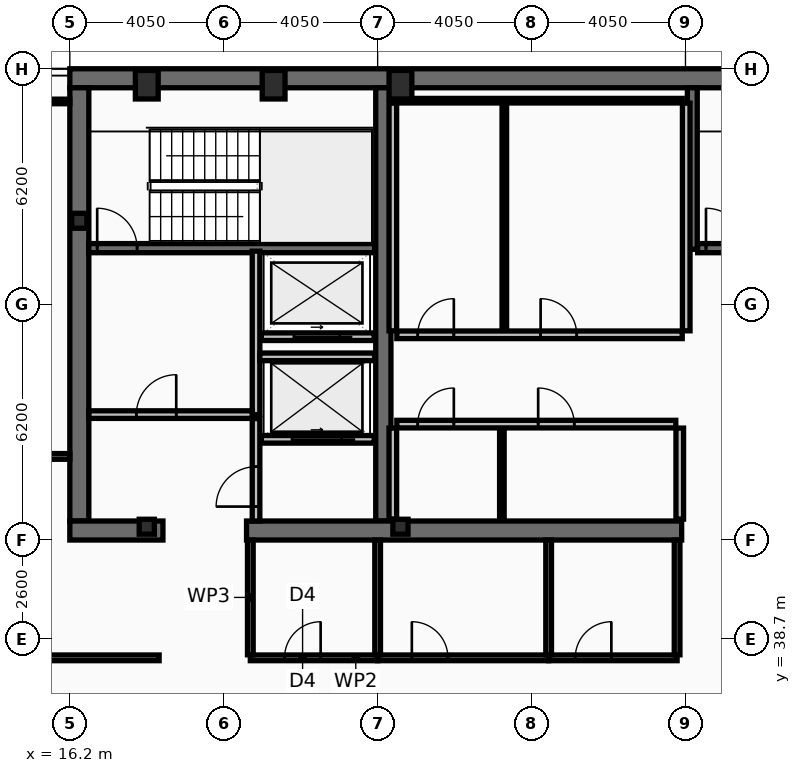
"""IFC4 building model, lengths in metres.
Left out: names, types, materials, properties, quantities, classifications, styles, units other than length and angle.
Written with IfcOpenShell. Run it as: python <this file> out.ifc"""

import sys

from ifc_helpers import new_model, si_unit, direction, frame, frame_2d, origin, origin_2d, place, context, subcontext, project, spatial, rectangle, hollow_rectangle, i_section, extrude, element, fill, save


model = new_model("IFC4")
c1 = context("Model", 3, precision=1e-05, world=origin(), true_north=direction((0.0, 1.0)))
c2 = subcontext(c1, "Body", "Model", "MODEL_VIEW")
j1 = project(units=[si_unit("LENGTHUNIT", "METRE"), si_unit("PLANEANGLEUNIT", "RADIAN")], contexts=[c1])
p1 = place(None, origin())
s1 = spatial("IfcSite", under=j1, at=p1, CompositionType="ELEMENT")
p2 = place(p1, origin())
s2 = spatial("IfcBuilding", under=s1, at=p2, CompositionType="ELEMENT")
p3 = place(p2, frame((0.0, 0.0, 287.8)))
s3 = spatial("IfcBuildingStorey", under=s2, at=p3, CompositionType="ELEMENT", Elevation=287.8)
p4 = place(p3, frame((16.2, 53.45, 0.0), z_axis=(0.0, 0.0, 1.0), x_axis=(1.0, 0.0, 0.0)))
e1 = element("IfcWall", 1, at=p4, inside=s3, PredefinedType="SHEAR", context=c2, shape_type="SweptSolid", body=[
    extrude(rectangle(XDim=40.5, YDim=0.5, at=frame_2d((20.25, 0.0))), origin(), (0.0, 0.0, 1.0), 3.44),
])
p5 = place(p3, frame((16.45, 41.8, 0.0), z_axis=(0.0, 0.0, 1.0), x_axis=(0.0, 1.0, 0.0)))
e2 = element("IfcWall", 2, at=p5, inside=s3, PredefinedType="SHEAR", context=c2, shape_type="SweptSolid", body=[
    extrude(rectangle(XDim=11.4, YDim=0.5, at=frame_2d((5.7, 0.0))), origin(), (0.0, 0.0, 1.0), 3.44),
])
p6 = place(p3, frame((24.45, 41.8, 0.0), z_axis=(0.0, 0.0, 1.0), x_axis=(0.0, 1.0, 0.0)))
e3 = element("IfcWall", 3, at=p6, inside=s3, PredefinedType="SHEAR", context=c2, shape_type="SweptSolid", body=[
    extrude(rectangle(XDim=11.4, YDim=0.4, at=frame_2d((5.7, 0.0))), origin(), (0.0, 0.0, 1.0), 3.44),
])
p7 = place(p3, frame((18.65, 41.55, 0.0), z_axis=(0.0, 0.0, 1.0), x_axis=(-1.0, 0.0, 0.0)))
e4 = element("IfcWall", 4, at=p7, inside=s3, PredefinedType="SHEAR", context=c2, shape_type="SweptSolid", body=[
    extrude(rectangle(XDim=2.45, YDim=0.5, at=frame_2d((1.225, 0.0))), origin(), (0.0, 0.0, 1.0), 3.44),
])
p8 = place(p3, frame((32.3, 41.55, 0.0), z_axis=(0.0, 0.0, 1.0), x_axis=(-1.0, 0.0, 0.0)))
e5 = element("IfcWall", 5, at=p8, inside=s3, PredefinedType="SHEAR", context=c2, shape_type="SweptSolid", body=[
    extrude(rectangle(XDim=11.45, YDim=0.5, at=frame_2d((5.725, 0.0))), origin(), (0.0, 0.0, 1.0), 3.44),
])
p9 = place(p3, frame((32.58, 48.95, 0.0), z_axis=(0.0, 0.0, 1.0), x_axis=(0.0, 1.0, 0.0)))
e6 = element("IfcWall", 6, at=p9, inside=s3, PredefinedType="SHEAR", context=c2, shape_type="SweptSolid", body=[
    extrude(rectangle(XDim=4.25, YDim=0.26, at=frame_2d((2.125, 0.0))), origin(), (0.0, 0.0, 1.0), 3.44),
])
p10 = place(p3, frame((16.7, 48.98, 0.0), z_axis=(0.0, 0.0, 1.0), x_axis=(1.0, 0.0, 0.0)))
e7 = element("IfcWall", 7, at=p10, inside=s3, PredefinedType="SHEAR", context=c2, shape_type="SweptSolid", body=[
    extrude(rectangle(XDim=7.52, YDim=0.24, at=frame_2d((3.76, 0.0))), origin(), (0.0, 0.0, 1.0), 3.44),
])
p11 = place(p10, frame((0.22, 0.0, 0.0)))
e8 = element("IfcOpeningElement", 8, at=p11, cuts=e7, PredefinedType="OPENING", context=c2, shape_type="SweptSolid", body=[
    extrude(rectangle(XDim=1.05, YDim=2.15, at=frame_2d((0.525, 1.075))), frame((0.0, 0.13, 0.0), z_axis=(0.0, -1.0, 0.0), x_axis=(1.0, 0.0, 0.0)), (0.0, 0.0, 1.0), 0.26),
])
p12 = place(p3, frame((32.72, 48.98, 0.0), z_axis=(0.0, 0.0, 1.0), x_axis=(1.0, 0.0, 0.0)))
e9 = element("IfcWall", 9, at=p12, inside=s3, PredefinedType="SHEAR", context=c2, shape_type="SweptSolid", body=[
    extrude(rectangle(XDim=7.56, YDim=0.24, at=frame_2d((3.78, 0.0))), origin(), (0.0, 0.0, 1.0), 3.44),
])
p13 = place(p12, frame((0.22, 0.0, 0.0)))
e10 = element("IfcOpeningElement", 10, at=p13, cuts=e9, PredefinedType="OPENING", context=c2, shape_type="SweptSolid", body=[
    extrude(rectangle(XDim=1.05, YDim=2.15, at=frame_2d((0.525, 1.075))), frame((0.0, 0.13, 0.0), z_axis=(0.0, -1.0, 0.0), x_axis=(1.0, 0.0, 0.0)), (0.0, 0.0, 1.0), 0.26),
])
for number, where, z_axis, x_axis in (
    (11, (18.225, 53.28, 0.0), (0.0, 0.0, 1.0), (1.0, 0.0, 0.0)),
    (12, (21.562, 53.28, 0.0), (0.0, 0.0, 1.0), (1.0, 0.0, 0.0)),
    (13, (24.9, 53.28, 0.0), (0.0, 0.0, 1.0), (1.0, 0.0, 0.0)),
):
    element("IfcColumn", number, at=place(p3, frame(where, z_axis=z_axis, x_axis=x_axis)), inside=s3, PredefinedType="COLUMN", context=c2, shape_type="SweptSolid", body=[
        extrude(hollow_rectangle(XDim=0.6, YDim=0.75, WallThickness=0.045, at=origin_2d()), origin(), (0.0, 0.0, 1.0), 3.6),
    ])
for number, where, z_axis, x_axis in (
    (14, (16.45, 49.7, 0.0), (0.0, 0.0, 1.0), (1.0, 0.0, 0.0)),
    (15, (18.225, 41.65, 0.0), (0.0, 0.0, 1.0), (1.0, 0.0, 0.0)),
    (16, (24.9, 41.65, 0.0), (0.0, 0.0, 1.0), (1.0, 0.0, 0.0)),
):
    element("IfcColumn", number, at=place(p3, frame(where, z_axis=z_axis, x_axis=x_axis)), inside=s3, PredefinedType="COLUMN", context=c2, shape_type="SweptSolid", body=[
        extrude(i_section(OverallWidth=0.399, OverallDepth=0.393, WebThickness=0.023, FlangeThickness=0.037, at=origin_2d()), origin(), (0.0, 0.0, 1.0), 3.6),
    ])
p14 = place(p3, frame((24.21, 43.95, 0.0), z_axis=(0.0, 0.0, 1.0), x_axis=(-1.0, 0.0, 0.0)))
e17 = element("IfcWall", 17, at=p14, inside=s3, PredefinedType="PARTITIONING", context=c2, shape_type="SweptSolid", body=[
    extrude(rectangle(XDim=2.97, YDim=0.2, at=frame_2d((1.485, 0.0))), origin(), (0.0, 0.0, 1.0), 3.44),
])
p15 = place(p14, frame((0.86, 0.0, 0.0)))
e18 = element("IfcOpeningElement", 18, at=p15, cuts=e17, PredefinedType="OPENING", context=c2, shape_type="SweptSolid", body=[
    extrude(rectangle(XDim=1.3, YDim=2.18, at=frame_2d((0.65, 1.09))), frame((0.0, 0.11, 0.0), z_axis=(0.0, -1.0, 0.0), x_axis=(1.0, 0.0, 0.0)), (0.0, 0.0, 1.0), 0.22),
])
p16 = place(p3, frame((24.21, 46.65, 0.0), z_axis=(0.0, 0.0, 1.0), x_axis=(-1.0, 0.0, 0.0)))
e19 = element("IfcWall", 19, at=p16, inside=s3, PredefinedType="PARTITIONING", context=c2, shape_type="SweptSolid", body=[
    extrude(rectangle(XDim=2.97, YDim=0.2, at=frame_2d((1.485, 0.0))), origin(), (0.0, 0.0, 1.0), 3.44),
])
p17 = place(p16, frame((0.91, 0.0, 0.0)))
e20 = element("IfcOpeningElement", 20, at=p17, cuts=e19, PredefinedType="OPENING", context=c2, shape_type="SweptSolid", body=[
    extrude(rectangle(XDim=1.2, YDim=2.18, at=frame_2d((0.6, 1.09))), frame((0.0, 0.11, 0.0), z_axis=(0.0, -1.0, 0.0), x_axis=(1.0, 0.0, 0.0)), (0.0, 0.0, 1.0), 0.22),
])
p18 = place(p3, frame((21.1, 44.6, 0.0), z_axis=(0.0, 0.0, 1.0), x_axis=(0.0, 1.0, 0.0)))
e21 = element("IfcWall", 21, at=p18, inside=s3, PredefinedType="PARTITIONING", context=c2, shape_type="SweptSolid", body=[
    extrude(rectangle(XDim=4.3, YDim=0.2, at=frame_2d((2.15, 0.0))), origin(), (0.0, 0.0, 1.0), 3.44),
])
p19 = place(p3, frame((16.7, 44.6, 0.0), z_axis=(0.0, 0.0, 1.0), x_axis=(1.0, 0.0, 0.0)))
e22 = element("IfcWall", 22, at=p19, inside=s3, PredefinedType="PARTITIONING", context=c2, shape_type="SweptSolid", body=[
    extrude(rectangle(XDim=4.3, YDim=0.2, at=frame_2d((2.15, 0.0))), origin(), (0.0, 0.0, 1.0), 3.44),
])
p20 = place(p19, frame((1.25, 0.0, 0.0)))
e23 = element("IfcOpeningElement", 23, at=p20, cuts=e22, PredefinedType="OPENING", context=c2, shape_type="SweptSolid", body=[
    extrude(rectangle(XDim=1.05, YDim=2.15, at=frame_2d((0.525, 1.075))), frame((0.0, 0.11, 0.0), z_axis=(0.0, -1.0, 0.0), x_axis=(1.0, 0.0, 0.0)), (0.0, 0.0, 1.0), 0.22),
])
p21 = place(p3, frame((21.2, 46.12, 0.0), z_axis=(0.0, 0.0, 1.0), x_axis=(1.0, 0.0, 0.0)))
e24 = element("IfcWall", 24, at=p21, inside=s3, PredefinedType="PARTITIONING", context=c2, shape_type="SweptSolid", body=[
    extrude(rectangle(XDim=3.02, YDim=0.2, at=frame_2d((1.51, 0.0))), origin(), (0.0, 0.0, 1.0), 3.44),
])
p22 = place(p3, frame((21.1, 41.8, 0.0), z_axis=(0.0, 0.0, 1.0), x_axis=(0.0, 1.0, 0.0)))
e25 = element("IfcWall", 25, at=p22, inside=s3, PredefinedType="PARTITIONING", context=c2, shape_type="SweptSolid", body=[
    extrude(rectangle(XDim=2.695, YDim=0.2, at=frame_2d((1.348, 0.0))), origin(), (0.0, 0.0, 1.0), 3.44),
])
p23 = place(p22, frame((0.38, 0.0, 0.0)))
e26 = element("IfcOpeningElement", 26, at=p23, cuts=e25, PredefinedType="OPENING", context=c2, shape_type="SweptSolid", body=[
    extrude(rectangle(XDim=1.05, YDim=2.15, at=frame_2d((0.525, 1.075))), frame((0.0, 0.11, 0.0), z_axis=(0.0, -1.0, 0.0), x_axis=(1.0, 0.0, 0.0)), (0.0, 0.0, 1.0), 0.22),
])
for number, where, z_axis, x_axis in (
    (27, (24.7, 46.805, 0.0), (0.0, 0.0, 1.0), (0.0, 1.0, 0.0)),
    (28, (32.42, 46.805, 0.0), (0.0, 0.0, 1.0), (0.0, 1.0, 0.0)),
):
    element("IfcWall", number, at=place(p3, frame(where, z_axis=z_axis, x_axis=x_axis)), inside=s3, PredefinedType="PARTITIONING", context=c2, shape_type="SweptSolid", body=[
        extrude(rectangle(XDim=5.99, YDim=0.2, at=frame_2d((2.995, 0.0))), origin(), (0.0, 0.0, 1.0), 3.44),
    ])
p24 = place(p3, frame((24.805, 52.86, 0.0), z_axis=(0.0, 0.0, 1.0), x_axis=(1.0, 0.0, 0.0)))
e29 = element("IfcWall", 29, at=p24, inside=s3, PredefinedType="PARTITIONING", context=c2, shape_type="SweptSolid", body=[
    extrude(rectangle(XDim=7.51, YDim=0.12, at=frame_2d((3.755, 0.0))), origin(), (0.0, 0.0, 1.0), 3.44),
])
p25 = place(p3, frame((27.634, 46.805, 0.0), z_axis=(0.0, 0.0, 1.0), x_axis=(0.0, 1.0, 0.0)))
e30 = element("IfcWall", 30, at=p25, inside=s3, PredefinedType="PARTITIONING", context=c2, shape_type="SweptSolid", body=[
    extrude(rectangle(XDim=5.99, YDim=0.12, at=frame_2d((2.995, 0.0))), origin(), (0.0, 0.0, 1.0), 3.44),
])
p26 = place(p3, frame((24.805, 46.7, 0.0), z_axis=(0.0, 0.0, 1.0), x_axis=(1.0, 0.0, 0.0)))
e31 = element("IfcWall", 31, at=p26, inside=s3, PredefinedType="PARTITIONING", context=c2, shape_type="SweptSolid", body=[
    extrude(rectangle(XDim=7.51, YDim=0.2, at=frame_2d((3.755, 0.0))), origin(), (0.0, 0.0, 1.0), 3.44),
])
p27 = place(p26, frame((0.55, 0.0, 0.0)))
e32 = element("IfcOpeningElement", 32, at=p27, cuts=e31, PredefinedType="OPENING", context=c2, shape_type="SweptSolid", body=[
    extrude(rectangle(XDim=0.95, YDim=2.1, at=frame_2d((0.475, 1.05))), frame((0.0, 0.11, 0.0), z_axis=(0.0, -1.0, 0.0), x_axis=(1.0, 0.0, 0.0)), (0.0, 0.0, 1.0), 0.22),
])
p28 = place(p26, frame((3.784, 0.0, 0.0)))
e33 = element("IfcOpeningElement", 33, at=p28, cuts=e31, PredefinedType="OPENING", context=c2, shape_type="SweptSolid", body=[
    extrude(rectangle(XDim=0.95, YDim=2.1, at=frame_2d((0.475, 1.05))), frame((0.0, 0.11, 0.0), z_axis=(0.0, -1.0, 0.0), x_axis=(1.0, 0.0, 0.0)), (0.0, 0.0, 1.0), 0.22),
])
for number, where, z_axis, x_axis in (
    (34, (24.7, 41.85, 0.0), (0.0, 0.0, 1.0), (0.0, 1.0, 0.0)),
    (35, (32.25, 41.85, 0.0), (0.0, 0.0, 1.0), (0.0, 1.0, 0.0)),
):
    element("IfcWall", number, at=place(p3, frame(where, z_axis=z_axis, x_axis=x_axis)), inside=s3, PredefinedType="PARTITIONING", context=c2, shape_type="SweptSolid", body=[
        extrude(rectangle(XDim=2.395, YDim=0.2, at=frame_2d((1.198, 0.0))), origin(), (0.0, 0.0, 1.0), 3.44),
    ])
p29 = place(p3, frame((27.569, 41.85, 0.0), z_axis=(0.0, 0.0, 1.0), x_axis=(0.0, 1.0, 0.0)))
e36 = element("IfcWall", 36, at=p29, inside=s3, PredefinedType="PARTITIONING", context=c2, shape_type="SweptSolid", body=[
    extrude(rectangle(XDim=2.395, YDim=0.12, at=frame_2d((1.198, 0.0))), origin(), (0.0, 0.0, 1.0), 3.44),
])
p30 = place(p3, frame((24.805, 44.35, 0.0), z_axis=(0.0, 0.0, 1.0), x_axis=(1.0, 0.0, 0.0)))
e37 = element("IfcWall", 37, at=p30, inside=s3, PredefinedType="PARTITIONING", context=c2, shape_type="SweptSolid", body=[
    extrude(rectangle(XDim=7.34, YDim=0.2, at=frame_2d((3.67, 0.0))), origin(), (0.0, 0.0, 1.0), 3.44),
])
p31 = place(p30, frame((0.55, 0.0, 0.0)))
e38 = element("IfcOpeningElement", 38, at=p31, cuts=e37, PredefinedType="OPENING", context=c2, shape_type="SweptSolid", body=[
    extrude(rectangle(XDim=0.95, YDim=2.1, at=frame_2d((0.475, 1.05))), frame((0.0, 0.11, 0.0), z_axis=(0.0, -1.0, 0.0), x_axis=(1.0, 0.0, 0.0)), (0.0, 0.0, 1.0), 0.22),
])
p32 = place(p30, frame((3.719, 0.0, 0.0)))
e39 = element("IfcOpeningElement", 39, at=p32, cuts=e37, PredefinedType="OPENING", context=c2, shape_type="SweptSolid", body=[
    extrude(rectangle(XDim=0.95, YDim=2.1, at=frame_2d((0.475, 1.05))), frame((0.0, 0.11, 0.0), z_axis=(0.0, -1.0, 0.0), x_axis=(1.0, 0.0, 0.0)), (0.0, 0.0, 1.0), 0.22),
])
p33 = place(p3, frame((20.95, 38.2, 0.0), z_axis=(0.0, 0.0, 1.0), x_axis=(1.0, 0.0, 0.0)))
e40 = element("IfcWall", 40, at=p33, inside=s3, PredefinedType="PARTITIONING", context=c2, shape_type="SweptSolid", body=[
    extrude(rectangle(XDim=3.35, YDim=0.15, at=frame_2d((1.675, 0.0))), origin(), (0.0, 0.0, 1.0), 3.44),
])
p34 = place(p33, frame((0.9, 0.0, 0.0)))
e41 = element("IfcOpeningElement", 41, at=p34, cuts=e40, PredefinedType="OPENING", context=c2, shape_type="SweptSolid", body=[
    extrude(rectangle(XDim=0.95, YDim=2.05, at=frame_2d((0.475, 1.025))), frame((0.0, 0.085, 0.0), z_axis=(0.0, -1.0, 0.0), x_axis=(1.0, 0.0, 0.0)), (0.0, 0.0, 1.0), 0.17),
])
p35 = place(p3, frame((24.3, 38.2, 0.0), z_axis=(0.0, 0.0, 1.0), x_axis=(1.0, 0.0, 0.0)))
e42 = element("IfcWall", 42, at=p35, inside=s3, PredefinedType="PARTITIONING", context=c2, shape_type="SweptSolid", body=[
    extrude(rectangle(XDim=4.5, YDim=0.15, at=frame_2d((2.25, 0.0))), origin(), (0.0, 0.0, 1.0), 2.78),
])
p36 = place(p35, frame((0.9, 0.0, 0.0)))
e43 = element("IfcOpeningElement", 43, at=p36, cuts=e42, PredefinedType="OPENING", context=c2, shape_type="SweptSolid", body=[
    extrude(rectangle(XDim=0.95, YDim=2.05, at=frame_2d((0.475, 1.025))), frame((0.0, 0.085, 0.0), z_axis=(0.0, -1.0, 0.0), x_axis=(1.0, 0.0, 0.0)), (0.0, 0.0, 1.0), 0.17),
])
p37 = place(p3, frame((28.8, 38.2, 0.0), z_axis=(0.0, 0.0, 1.0), x_axis=(1.0, 0.0, 0.0)))
e44 = element("IfcWall", 44, at=p37, inside=s3, PredefinedType="PARTITIONING", context=c2, shape_type="SweptSolid", body=[
    extrude(rectangle(XDim=3.38, YDim=0.15, at=frame_2d((1.69, 0.0))), origin(), (0.0, 0.0, 1.0), 2.78),
])
p38 = place(p37, frame((0.7, 0.0, 0.0)))
e45 = element("IfcOpeningElement", 45, at=p38, cuts=e44, PredefinedType="OPENING", context=c2, shape_type="SweptSolid", body=[
    extrude(rectangle(XDim=0.95, YDim=2.05, at=frame_2d((0.475, 1.025))), frame((0.0, 0.085, 0.0), z_axis=(0.0, -1.0, 0.0), x_axis=(1.0, 0.0, 0.0)), (0.0, 0.0, 1.0), 0.17),
])
for number, where, z_axis, x_axis in (
    (46, (20.95, 38.28, 0.0), (0.0, 0.0, 1.0), (0.0, 1.0, 0.0)),
    (47, (24.3, 38.28, 0.0), (0.0, 0.0, 1.0), (0.0, 1.0, 0.0)),
    (48, (28.8, 38.28, 0.0), (0.0, 0.0, 1.0), (0.0, 1.0, 0.0)),
    (49, (32.18, 38.28, 0.0), (0.0, 0.0, 1.0), (0.0, 1.0, 0.0)),
):
    element("IfcWall", number, at=place(p3, frame(where, z_axis=z_axis, x_axis=x_axis)), inside=s3, PredefinedType="PARTITIONING", context=c2, shape_type="SweptSolid", body=[
        extrude(rectangle(XDim=3.02, YDim=0.15, at=frame_2d((1.51, 0.0))), origin(), (0.0, 0.0, 1.0), 3.44),
    ])
p39 = place(p3, frame((10.03, 38.2, 0.0), z_axis=(0.0, 0.0, 1.0), x_axis=(1.0, 0.0, 0.0)))
e50 = element("IfcWall", 50, at=p39, inside=s3, PredefinedType="PARTITIONING", context=c2, shape_type="SweptSolid", body=[
    extrude(rectangle(XDim=8.52, YDim=0.15, at=frame_2d((4.26, 0.0))), origin(), (0.0, 0.0, 1.0), 2.78),
])
p40 = place(p39, frame((4.32, 0.0, 0.0)))
e51 = element("IfcOpeningElement", 51, at=p40, cuts=e50, PredefinedType="OPENING", context=c2, shape_type="SweptSolid", body=[
    extrude(rectangle(XDim=0.95, YDim=2.05, at=frame_2d((0.475, 1.025))), frame((0.0, 0.085, 0.0), z_axis=(0.0, -1.0, 0.0), x_axis=(1.0, 0.0, 0.0)), (0.0, 0.0, 1.0), 0.17),
])
p41 = place(p3, frame((10.095, 43.5, 0.0), z_axis=(0.0, 0.0, 1.0), x_axis=(1.0, 0.0, 0.0)))
e52 = element("IfcWall", 52, at=p41, inside=s3, PredefinedType="PARTITIONING", context=c2, shape_type="SweptSolid", body=[
    extrude(rectangle(XDim=6.105, YDim=0.15, at=frame_2d((3.052, 0.0))), origin(), (0.0, 0.0, 1.0), 2.09),
])
p42 = place(p41, frame((4.32, 0.0, 0.0)))
e53 = element("IfcOpeningElement", 53, at=p42, cuts=e52, PredefinedType="OPENING", context=c2, shape_type="SweptSolid", body=[
    extrude(rectangle(XDim=0.9, YDim=2.05, at=frame_2d((0.45, 1.025))), frame((0.0, 0.085, 0.0), z_axis=(0.0, -1.0, 0.0), x_axis=(1.0, 0.0, 0.0)), (0.0, 0.0, 1.0), 0.17),
])
p43 = place(p3, frame((10.095, 52.84, 0.0), z_axis=(0.0, 0.0, 1.0), x_axis=(1.0, 0.0, 0.0)))
e54 = element("IfcWall", 54, at=p43, inside=s3, PredefinedType="PARTITIONING", context=c2, shape_type="SweptSolid", body=[
    extrude(rectangle(XDim=6.105, YDim=0.12, at=frame_2d((3.052, 0.0))), origin(), (0.0, 0.0, 1.0), 3.44),
])
p44 = place(p11, origin())
e55 = element("IfcDoor", 55, at=p44, inside=s3, OperationType="SINGLE_SWING_LEFT", PredefinedType="DOOR", context=c2, shape_type="SweptSolid", body=[
    extrude(rectangle(XDim=1.05, YDim=2.15, at=frame_2d((0.525, 1.075))), frame((0.0, 0.025, 0.0), z_axis=(0.0, -1.0, 0.0), x_axis=(1.0, 0.0, 0.0)), (0.0, 0.0, 1.0), 0.05),
])
fill(e8, e55)
p45 = place(p13, origin())
e56 = element("IfcDoor", 56, at=p45, inside=s3, OperationType="SINGLE_SWING_LEFT", PredefinedType="DOOR", context=c2, shape_type="SweptSolid", body=[
    extrude(rectangle(XDim=1.05, YDim=2.15, at=frame_2d((0.525, 1.075))), frame((0.0, 0.025, 0.0), z_axis=(0.0, -1.0, 0.0), x_axis=(1.0, 0.0, 0.0)), (0.0, 0.0, 1.0), 0.05),
])
fill(e10, e56)
p46 = place(p15, origin())
e57 = element("IfcDoor", 57, at=p46, inside=s3, OperationType="SLIDING_TO_LEFT", PredefinedType="DOOR", context=c2, shape_type="SweptSolid", body=[
    extrude(rectangle(XDim=1.3, YDim=2.18, at=frame_2d((0.65, 1.09))), frame((0.0, 0.025, 0.0), z_axis=(0.0, -1.0, 0.0), x_axis=(1.0, 0.0, 0.0)), (0.0, 0.0, 1.0), 0.05),
])
fill(e18, e57)
p47 = place(p17, origin())
e58 = element("IfcDoor", 58, at=p47, inside=s3, OperationType="SLIDING_TO_LEFT", PredefinedType="DOOR", context=c2, shape_type="SweptSolid", body=[
    extrude(rectangle(XDim=1.2, YDim=2.18, at=frame_2d((0.6, 1.09))), frame((0.0, 0.025, 0.0), z_axis=(0.0, -1.0, 0.0), x_axis=(1.0, 0.0, 0.0)), (0.0, 0.0, 1.0), 0.05),
])
fill(e20, e58)
p48 = place(p20, origin())
e59 = element("IfcDoor", 59, at=p48, inside=s3, OperationType="SINGLE_SWING_RIGHT", PredefinedType="DOOR", context=c2, shape_type="SweptSolid", body=[
    extrude(rectangle(XDim=1.05, YDim=2.15, at=frame_2d((0.525, 1.075))), frame((0.0, 0.025, 0.0), z_axis=(0.0, -1.0, 0.0), x_axis=(1.0, 0.0, 0.0)), (0.0, 0.0, 1.0), 0.05),
])
fill(e23, e59)
p49 = place(p23, origin())
e60 = element("IfcDoor", 60, at=p49, inside=s3, OperationType="SINGLE_SWING_LEFT", PredefinedType="DOOR", context=c2, shape_type="SweptSolid", body=[
    extrude(rectangle(XDim=1.05, YDim=2.15, at=frame_2d((0.525, 1.075))), frame((0.0, 0.025, 0.0), z_axis=(0.0, -1.0, 0.0), x_axis=(1.0, 0.0, 0.0)), (0.0, 0.0, 1.0), 0.05),
])
fill(e26, e60)
p50 = place(p27, origin())
e61 = element("IfcDoor", 61, at=p50, inside=s3, OperationType="SINGLE_SWING_RIGHT", PredefinedType="DOOR", context=c2, shape_type="SweptSolid", body=[
    extrude(rectangle(XDim=0.95, YDim=2.1, at=frame_2d((0.475, 1.05))), frame((0.0, 0.025, 0.0), z_axis=(0.0, -1.0, 0.0), x_axis=(1.0, 0.0, 0.0)), (0.0, 0.0, 1.0), 0.05),
])
fill(e32, e61)
p51 = place(p28, origin())
e62 = element("IfcDoor", 62, at=p51, inside=s3, OperationType="SINGLE_SWING_LEFT", PredefinedType="DOOR", context=c2, shape_type="SweptSolid", body=[
    extrude(rectangle(XDim=0.95, YDim=2.1, at=frame_2d((0.475, 1.05))), frame((0.0, 0.025, 0.0), z_axis=(0.0, -1.0, 0.0), x_axis=(1.0, 0.0, 0.0)), (0.0, 0.0, 1.0), 0.05),
])
fill(e33, e62)
p52 = place(p31, origin())
e63 = element("IfcDoor", 63, at=p52, inside=s3, OperationType="SINGLE_SWING_RIGHT", PredefinedType="DOOR", context=c2, shape_type="SweptSolid", body=[
    extrude(rectangle(XDim=0.95, YDim=2.1, at=frame_2d((0.475, 1.05))), frame((0.0, 0.025, 0.0), z_axis=(0.0, -1.0, 0.0), x_axis=(1.0, 0.0, 0.0)), (0.0, 0.0, 1.0), 0.05),
])
fill(e38, e63)
p53 = place(p32, origin())
e64 = element("IfcDoor", 64, at=p53, inside=s3, OperationType="SINGLE_SWING_LEFT", PredefinedType="DOOR", context=c2, shape_type="SweptSolid", body=[
    extrude(rectangle(XDim=0.95, YDim=2.1, at=frame_2d((0.475, 1.05))), frame((0.0, 0.025, 0.0), z_axis=(0.0, -1.0, 0.0), x_axis=(1.0, 0.0, 0.0)), (0.0, 0.0, 1.0), 0.05),
])
fill(e39, e64)
p54 = place(p34, origin())
e65 = element("IfcDoor", 65, at=p54, inside=s3, OperationType="SINGLE_SWING_RIGHT", PredefinedType="DOOR", context=c2, shape_type="SweptSolid", body=[
    extrude(rectangle(XDim=0.95, YDim=2.05, at=frame_2d((0.475, 1.025))), frame((0.0, 0.025, 0.0), z_axis=(0.0, -1.0, 0.0), x_axis=(1.0, 0.0, 0.0)), (0.0, 0.0, 1.0), 0.05),
])
fill(e41, e65)
p55 = place(p36, origin())
e66 = element("IfcDoor", 66, at=p55, inside=s3, OperationType="SINGLE_SWING_LEFT", PredefinedType="DOOR", context=c2, shape_type="SweptSolid", body=[
    extrude(rectangle(XDim=0.95, YDim=2.05, at=frame_2d((0.475, 1.025))), frame((0.0, 0.025, 0.0), z_axis=(0.0, -1.0, 0.0), x_axis=(1.0, 0.0, 0.0)), (0.0, 0.0, 1.0), 0.05),
])
fill(e43, e66)
p56 = place(p38, origin())
e67 = element("IfcDoor", 67, at=p56, inside=s3, OperationType="SINGLE_SWING_RIGHT", PredefinedType="DOOR", context=c2, shape_type="SweptSolid", body=[
    extrude(rectangle(XDim=0.95, YDim=2.05, at=frame_2d((0.475, 1.025))), frame((0.0, 0.025, 0.0), z_axis=(0.0, -1.0, 0.0), x_axis=(1.0, 0.0, 0.0)), (0.0, 0.0, 1.0), 0.05),
])
fill(e45, e67)
save(model, sys.argv[1])
